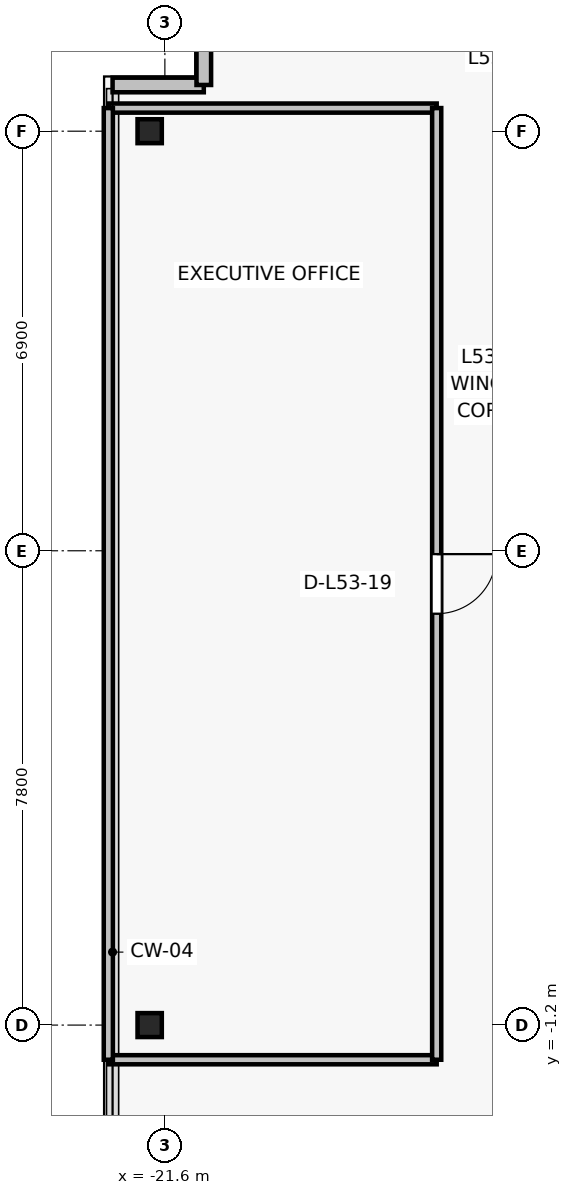
"""IFC4 building model, lengths in metres.
Left out: names, types, materials, properties, quantities, classifications, styles, units other than length and angle.
Written with IfcOpenShell. Run it as: python <this file> out.ifc"""

import sys

from ifc_helpers import new_model, si_unit, direction, frame, frame_2d, origin, origin_2d, place, context, subcontext, project, spatial, rectangle, i_section, extrude, source, transform, mapped, element, fill, save


model = new_model("IFC4")
c1 = context("Model", 3, precision=1e-05, world=origin(), true_north=direction((0.0, 1.0)))
c2 = subcontext(c1, "Body", "Model", "MODEL_VIEW")
j1 = project(units=[si_unit("LENGTHUNIT", "METRE"), si_unit("PLANEANGLEUNIT", "RADIAN")], contexts=[c1])
p1 = place(None, origin())
s1 = spatial("IfcSite", under=j1, at=p1, CompositionType="ELEMENT")
p2 = place(p1, origin())
s2 = spatial("IfcBuilding", under=s1, at=p2, CompositionType="ELEMENT")
p3 = place(p2, frame((0.0, 0.0, 189.1)))
s3 = spatial("IfcBuildingStorey", under=s2, at=p3, CompositionType="ELEMENT", Elevation=189.1)
for number, where, z_axis, x_axis in (
    (1, (-21.85, -1.2, 0.0), (0.0, 0.0, 1.0), (1.0, 0.0, 0.0)),
    (2, (-21.85, 13.5, 0.0), (0.0, 0.0, 1.0), (1.0, 0.0, 0.0)),
):
    element("IfcColumn", number, at=place(p3, frame(where, z_axis=z_axis, x_axis=x_axis)), inside=s3, PredefinedType="COLUMN", context=c2, shape_type="SweptSolid", body=[
        extrude(i_section(OverallWidth=0.399, OverallDepth=0.394, WebThickness=0.023, FlangeThickness=0.037, FilletRadius=0.015, at=origin_2d()), origin(), (0.0, 0.0, 1.0), 3.3),
    ])
for number, where, z_axis, x_axis in (
    (3, (-20.96, 14.26, 0.0), (0.0, 0.0, 1.0), (-1.0, 0.0, 0.0)),
    (4, (-20.96, 15.76, 0.0), (0.0, 0.0, 1.0), (0.0, -1.0, 0.0)),
):
    element("IfcWall", number, at=place(p3, frame(where, z_axis=z_axis, x_axis=x_axis)), inside=s3, PredefinedType="SOLIDWALL", context=c2, shape_type="SweptSolid", body=[
        extrude(rectangle(XDim=1.5, YDim=0.24, at=frame_2d((0.75, 0.0))), origin(), (0.0, 0.0, 1.0), 3.075),
    ])
p4 = place(p3, frame((-17.13, -1.77, 0.0), z_axis=(0.0, 0.0, 1.0), x_axis=(-1.0, 0.0, 0.0)))
e5 = element("IfcWall", 5, at=p4, inside=s3, PredefinedType="PARTITIONING", context=c2, shape_type="SweptSolid", body=[
    extrude(rectangle(XDim=5.4, YDim=0.15, at=frame_2d((2.7, 0.0))), origin(), (0.0, 0.0, 1.0), 2.565),
])
p5 = place(p3, frame((-22.53, 13.88, 0.0), z_axis=(0.0, 0.0, 1.0), x_axis=(1.0, 0.0, 0.0)))
e6 = element("IfcWall", 6, at=p5, inside=s3, PredefinedType="PARTITIONING", context=c2, shape_type="SweptSolid", body=[
    extrude(rectangle(XDim=5.4, YDim=0.15, at=frame_2d((2.7, 0.0))), origin(), (0.0, 0.0, 1.0), 3.075),
])
p6 = place(p3, frame((-22.53, -1.77, 0.0), z_axis=(0.0, 0.0, 1.0), x_axis=(0.0, 1.0, 0.0)))
e7 = element("IfcWall", 7, at=p6, inside=s3, PredefinedType="PARTITIONING", context=c2, shape_type="SweptSolid", body=[
    extrude(rectangle(XDim=15.65, YDim=0.15, at=frame_2d((7.825, 0.0))), origin(), (0.0, 0.0, 1.0), 3.075),
])
p7 = place(p3, frame((-17.13, 13.88, 0.0), z_axis=(0.0, 0.0, 1.0), x_axis=(0.0, -1.0, 0.0)))
e8 = element("IfcWall", 8, at=p7, inside=s3, PredefinedType="PARTITIONING", context=c2, shape_type="SweptSolid", body=[
    extrude(rectangle(XDim=15.65, YDim=0.15, at=frame_2d((7.825, 0.0))), origin(), (0.0, 0.0, 1.0), 2.565),
])
p8 = place(p7, frame((7.335, 0.0, 0.0)))
e9 = element("IfcOpeningElement", 9, at=p8, cuts=e8, PredefinedType="OPENING", context=c2, shape_type="SweptSolid", body=[
    extrude(rectangle(XDim=0.98, YDim=2.15, at=frame_2d((0.49, 1.075))), frame((0.0, 0.085, 0.0), z_axis=(0.0, -1.0, 0.0), x_axis=(1.0, 0.0, 0.0)), (0.0, 0.0, 1.0), 0.17),
])
m1 = source(origin(), c2, "Body", "SweptSolid", [
    extrude(rectangle(XDim=0.98, YDim=2.15, at=frame_2d((0.49, 1.075))), frame((0.0, 0.025, 0.0), z_axis=(0.0, -1.0, 0.0), x_axis=(1.0, 0.0, 0.0)), (0.0, 0.0, 1.0), 0.05),
])
p9 = place(p8, origin())
e10 = element("IfcDoor", 10, at=p9, inside=s3, OperationType="SINGLE_SWING_LEFT", PredefinedType="DOOR", context=c2, shape_type="MappedRepresentation", body=[
    mapped(m1, transform((0.0, 0.0, 0.0), x_axis=(1.0, 0.0, 0.0), y_axis=(0.0, 1.0, 0.0), z_axis=(0.0, 0.0, 1.0), scale=1.0)),
])
fill(e9, e10)
save(model, sys.argv[1])
